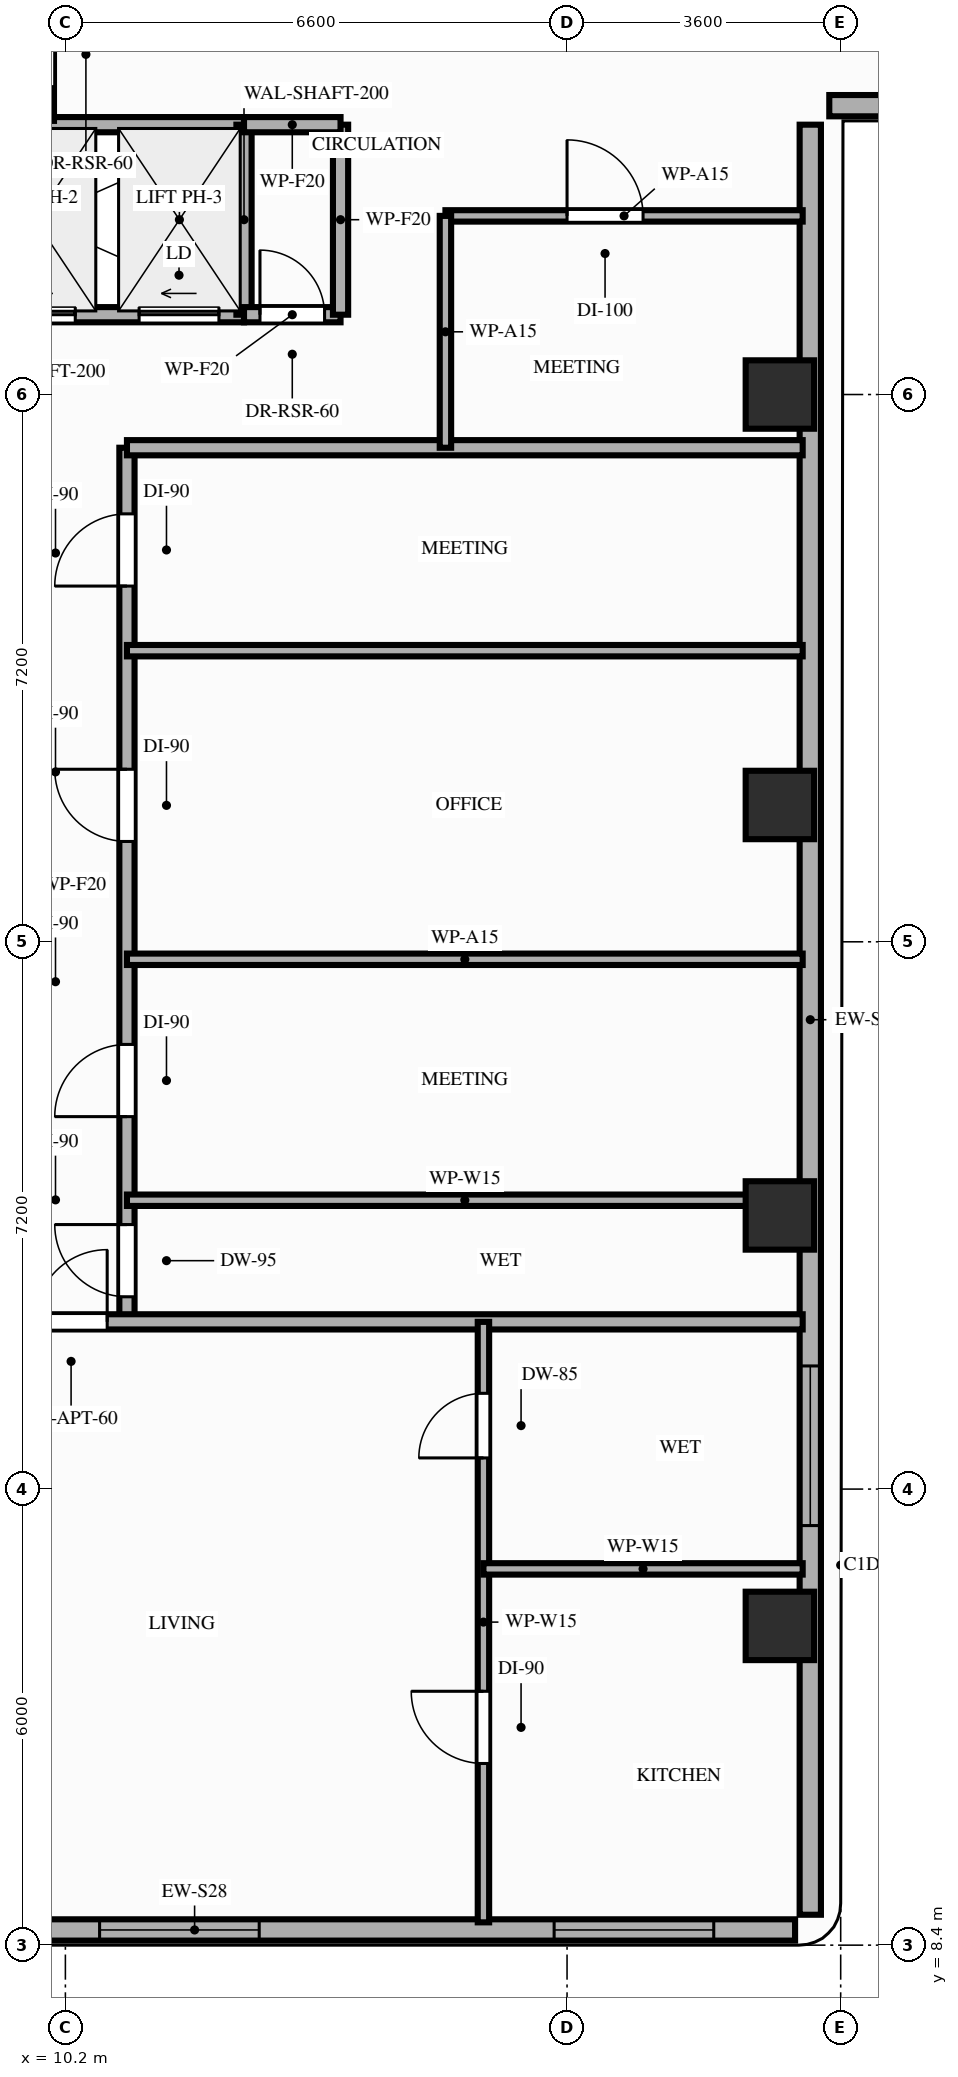
"""IFC4 building model, lengths in metres.
Left out: names, types, materials, properties, quantities, classifications, styles, units other than length and angle.
Written with IfcOpenShell. Run it as: python <this file> out.ifc"""

import sys

from ifc_helpers import new_model, si_unit, direction, frame, frame_2d, origin, origin_2d, place, context, subcontext, project, spatial, rectangle, extrude, element, fill, save


model = new_model("IFC4")
c1 = context("Model", 3, precision=1e-05, world=origin(), true_north=direction((0.0, 1.0)))
c2 = subcontext(c1, "Body", "Model", "MODEL_VIEW")
j1 = project(units=[si_unit("LENGTHUNIT", "METRE"), si_unit("PLANEANGLEUNIT", "RADIAN")], contexts=[c1])
p1 = place(None, origin())
s1 = spatial("IfcSite", under=j1, at=p1, CompositionType="ELEMENT")
p2 = place(p1, origin())
s2 = spatial("IfcBuilding", under=s1, at=p2, CompositionType="ELEMENT")
p3 = place(p2, frame((0.0, 0.0, 208.0)))
s3 = spatial("IfcBuildingStorey", under=s2, at=p3, CompositionType="ELEMENT", Elevation=208.0)
for number, where, z_axis, x_axis in (
    (1, (19.6, 12.6, 0.0), (0.0, 0.0, 1.0), (1.0, 0.0, 0.0)),
    (2, (19.6, 18.0, 0.0), (0.0, 0.0, 1.0), (1.0, 0.0, 0.0)),
    (3, (19.6, 23.4, 0.0), (0.0, 0.0, 1.0), (1.0, 0.0, 0.0)),
    (4, (19.6, 28.8, 0.0), (0.0, 0.0, 1.0), (1.0, 0.0, 0.0)),
):
    element("IfcColumn", number, at=place(p3, frame(where, z_axis=z_axis, x_axis=x_axis)), inside=s3, PredefinedType="COLUMN", context=c2, shape_type="SweptSolid", body=[
        extrude(rectangle(XDim=0.9, YDim=0.9, at=origin_2d()), origin(), (0.0, 0.0, 1.0), 3.2),
    ])
p4 = place(p3, frame((4.0, 8.6, 0.0), z_axis=(0.0, 0.0, 1.0), x_axis=(1.0, 0.0, 0.0)))
e5 = element("IfcWall", 5, at=p4, inside=s3, PredefinedType="STANDARD", context=c2, shape_type="SweptSolid", body=[
    extrude(rectangle(XDim=15.8, YDim=0.28, at=frame_2d((7.9, 0.0))), origin(), (0.0, 0.0, 1.0), 3.02),
])
p5 = place(p4, frame((6.65, 0.0, 0.85)))
e6 = element("IfcOpeningElement", 6, at=p5, cuts=e5, PredefinedType="OPENING", context=c2, shape_type="SweptSolid", body=[
    extrude(rectangle(XDim=2.1, YDim=1.8, at=frame_2d((1.05, 0.9))), frame((0.0, 0.15, 0.0), z_axis=(0.0, -1.0, 0.0), x_axis=(1.0, 0.0, 0.0)), (0.0, 0.0, 1.0), 0.3),
])
p6 = place(p4, frame((12.63, 0.0, 0.85)))
e7 = element("IfcOpeningElement", 7, at=p6, cuts=e5, PredefinedType="OPENING", context=c2, shape_type="SweptSolid", body=[
    extrude(rectangle(XDim=2.1, YDim=1.8, at=frame_2d((1.05, 0.9))), frame((0.0, 0.15, 0.0), z_axis=(0.0, -1.0, 0.0), x_axis=(1.0, 0.0, 0.0)), (0.0, 0.0, 1.0), 0.3),
])
p7 = place(p3, frame((20.0, 8.8, 0.0), z_axis=(0.0, 0.0, 1.0), x_axis=(0.0, 1.0, 0.0)))
e8 = element("IfcWall", 8, at=p7, inside=s3, PredefinedType="STANDARD", context=c2, shape_type="SweptSolid", body=[
    extrude(rectangle(XDim=23.55, YDim=0.28, at=frame_2d((11.775, 0.0))), origin(), (0.0, 0.0, 1.0), 2.51),
])
p8 = place(p7, frame((5.12, 0.0, 0.85)))
e9 = element("IfcOpeningElement", 9, at=p8, cuts=e8, PredefinedType="OPENING", context=c2, shape_type="SweptSolid", body=[
    extrude(rectangle(XDim=2.1, YDim=1.41, at=frame_2d((1.05, 0.705))), frame((0.0, 0.15, 0.0), z_axis=(0.0, -1.0, 0.0), x_axis=(1.0, 0.0, 0.0)), (0.0, 0.0, 1.0), 0.3),
])
p9 = place(p3, frame((20.25, 32.6, 0.0), z_axis=(0.0, 0.0, 1.0), x_axis=(1.0, 0.0, 0.0)))
e10 = element("IfcWall", 10, at=p9, inside=s3, PredefinedType="STANDARD", context=c2, shape_type="SweptSolid", body=[
    extrude(rectangle(XDim=7.35, YDim=0.28, at=frame_2d((3.675, 0.0))), origin(), (0.0, 0.0, 1.0), 2.51),
])
p10 = place(p3, frame((7.0, 29.85, 0.0), z_axis=(0.0, 0.0, 1.0), x_axis=(1.0, 0.0, 0.0)))
e11 = element("IfcWall", 11, at=p10, inside=s3, PredefinedType="MOVABLE", context=c2, shape_type="SweptSolid", body=[
    extrude(rectangle(XDim=5.55, YDim=0.2, at=frame_2d((2.775, 0.0))), origin(), (0.0, 0.0, 1.0), 3.02),
])
p11 = place(p10, frame((0.38, 0.0, 0.0)))
e12 = element("IfcOpeningElement", 12, at=p11, cuts=e11, PredefinedType="OPENING", context=c2, shape_type="SweptSolid", body=[
    extrude(rectangle(XDim=1.05, YDim=2.15, at=frame_2d((0.525, 1.075))), frame((0.0, 0.11, 0.0), z_axis=(0.0, -1.0, 0.0), x_axis=(1.0, 0.0, 0.0)), (0.0, 0.0, 1.0), 0.22),
])
p12 = place(p10, frame((2.28, 0.0, 0.0)))
e13 = element("IfcOpeningElement", 13, at=p12, cuts=e11, PredefinedType="OPENING", context=c2, shape_type="SweptSolid", body=[
    extrude(rectangle(XDim=1.05, YDim=2.15, at=frame_2d((0.525, 1.075))), frame((0.0, 0.11, 0.0), z_axis=(0.0, -1.0, 0.0), x_axis=(1.0, 0.0, 0.0)), (0.0, 0.0, 1.0), 0.22),
])
p13 = place(p10, frame((4.17, 0.0, 0.0)))
e14 = element("IfcOpeningElement", 14, at=p13, cuts=e11, PredefinedType="OPENING", context=c2, shape_type="SweptSolid", body=[
    extrude(rectangle(XDim=1.05, YDim=2.15, at=frame_2d((0.525, 1.075))), frame((0.0, 0.11, 0.0), z_axis=(0.0, -1.0, 0.0), x_axis=(1.0, 0.0, 0.0)), (0.0, 0.0, 1.0), 0.22),
])
p14 = place(p3, frame((7.0, 32.35, 0.0), z_axis=(0.0, 0.0, 1.0), x_axis=(1.0, 0.0, 0.0)))
e15 = element("IfcWall", 15, at=p14, inside=s3, PredefinedType="MOVABLE", context=c2, shape_type="SweptSolid", body=[
    extrude(rectangle(XDim=5.55, YDim=0.2, at=frame_2d((2.775, 0.0))), origin(), (0.0, 0.0, 1.0), 3.02),
])
p15 = place(p3, frame((12.55, 29.85, 0.0), z_axis=(0.0, 0.0, 1.0), x_axis=(0.0, 1.0, 0.0)))
e16 = element("IfcWall", 16, at=p15, inside=s3, PredefinedType="MOVABLE", context=c2, shape_type="SweptSolid", body=[
    extrude(rectangle(XDim=2.5, YDim=0.2, at=frame_2d((1.25, 0.0))), origin(), (0.0, 0.0, 1.0), 3.02),
])
p16 = place(p3, frame((12.55, 29.85, 0.0), z_axis=(0.0, 0.0, 1.0), x_axis=(1.0, 0.0, 0.0)))
e17 = element("IfcWall", 17, at=p16, inside=s3, PredefinedType="PARTITIONING", context=c2, shape_type="SweptSolid", body=[
    extrude(rectangle(XDim=1.27, YDim=0.2, at=frame_2d((0.635, 0.0))), origin(), (0.0, 0.0, 1.0), 3.02),
])
p17 = place(p16, frame((0.21, 0.0, 0.0)))
e18 = element("IfcOpeningElement", 18, at=p17, cuts=e17, PredefinedType="OPENING", context=c2, shape_type="SweptSolid", body=[
    extrude(rectangle(XDim=0.85, YDim=2.05, at=frame_2d((0.425, 1.025))), frame((0.0, 0.11, 0.0), z_axis=(0.0, -1.0, 0.0), x_axis=(1.0, 0.0, 0.0)), (0.0, 0.0, 1.0), 0.22),
])
p18 = place(p3, frame((13.82, 29.85, 0.0), z_axis=(0.0, 0.0, 1.0), x_axis=(0.0, 1.0, 0.0)))
e19 = element("IfcWall", 19, at=p18, inside=s3, PredefinedType="PARTITIONING", context=c2, shape_type="SweptSolid", body=[
    extrude(rectangle(XDim=2.5, YDim=0.2, at=frame_2d((1.25, 0.0))), origin(), (0.0, 0.0, 1.0), 3.02),
])
p19 = place(p3, frame((12.55, 32.35, 0.0), z_axis=(0.0, 0.0, 1.0), x_axis=(1.0, 0.0, 0.0)))
e20 = element("IfcWall", 20, at=p19, inside=s3, PredefinedType="PARTITIONING", context=c2, shape_type="SweptSolid", body=[
    extrude(rectangle(XDim=1.27, YDim=0.2, at=frame_2d((0.635, 0.0))), origin(), (0.0, 0.0, 1.0), 3.02),
])
p20 = place(p3, frame((9.95, 32.4, 0.0), z_axis=(0.0, 0.0, 1.0), x_axis=(0.0, 1.0, 0.0)))
e21 = element("IfcWall", 21, at=p20, inside=s3, PredefinedType="PARTITIONING", context=c2, shape_type="SweptSolid", body=[
    extrude(rectangle(XDim=1.52, YDim=0.2, at=frame_2d((0.76, 0.0))), origin(), (0.0, 0.0, 1.0), 2.51),
])
p21 = place(p20, frame((0.45, 0.0, 0.0)))
e22 = element("IfcOpeningElement", 22, at=p21, cuts=e21, PredefinedType="OPENING", context=c2, shape_type="SweptSolid", body=[
    extrude(rectangle(XDim=0.85, YDim=2.05, at=frame_2d((0.425, 1.025))), frame((0.0, 0.11, 0.0), z_axis=(0.0, -1.0, 0.0), x_axis=(1.0, 0.0, 0.0)), (0.0, 0.0, 1.0), 0.22),
])
p22 = place(p3, frame((11.01, 16.6, 0.0), z_axis=(0.0, 0.0, 1.0), x_axis=(0.0, 1.0, 0.0)))
e23 = element("IfcWall", 23, at=p22, inside=s3, PredefinedType="PARTITIONING", context=c2, shape_type="SweptSolid", body=[
    extrude(rectangle(XDim=11.5, YDim=0.2, at=frame_2d((5.75, 0.0))), origin(), (0.0, 0.0, 1.0), 2.51),
])
p23 = place(p22, frame((0.33, 0.0, 0.0)))
e24 = element("IfcOpeningElement", 24, at=p23, cuts=e23, PredefinedType="OPENING", context=c2, shape_type="SweptSolid", body=[
    extrude(rectangle(XDim=0.95, YDim=2.1, at=frame_2d((0.475, 1.05))), frame((0.0, 0.11, 0.0), z_axis=(0.0, -1.0, 0.0), x_axis=(1.0, 0.0, 0.0)), (0.0, 0.0, 1.0), 0.22),
])
p24 = place(p22, frame((2.7, 0.0, 0.0)))
e25 = element("IfcOpeningElement", 25, at=p24, cuts=e23, PredefinedType="OPENING", context=c2, shape_type="SweptSolid", body=[
    extrude(rectangle(XDim=0.95, YDim=2.15, at=frame_2d((0.475, 1.075))), frame((0.0, 0.11, 0.0), z_axis=(0.0, -1.0, 0.0), x_axis=(1.0, 0.0, 0.0)), (0.0, 0.0, 1.0), 0.22),
])
p25 = place(p22, frame((6.32, 0.0, 0.0)))
e26 = element("IfcOpeningElement", 26, at=p25, cuts=e23, PredefinedType="OPENING", context=c2, shape_type="SweptSolid", body=[
    extrude(rectangle(XDim=0.95, YDim=2.15, at=frame_2d((0.475, 1.075))), frame((0.0, 0.11, 0.0), z_axis=(0.0, -1.0, 0.0), x_axis=(1.0, 0.0, 0.0)), (0.0, 0.0, 1.0), 0.22),
])
p26 = place(p22, frame((9.68, 0.0, 0.0)))
e27 = element("IfcOpeningElement", 27, at=p26, cuts=e23, PredefinedType="OPENING", context=c2, shape_type="SweptSolid", body=[
    extrude(rectangle(XDim=0.95, YDim=2.15, at=frame_2d((0.475, 1.075))), frame((0.0, 0.11, 0.0), z_axis=(0.0, -1.0, 0.0), x_axis=(1.0, 0.0, 0.0)), (0.0, 0.0, 1.0), 0.22),
])
p27 = place(p3, frame((3.9, 16.6, 0.0), z_axis=(0.0, 0.0, 1.0), x_axis=(1.0, 0.0, 0.0)))
e28 = element("IfcWall", 28, at=p27, inside=s3, PredefinedType="PARTITIONING", context=c2, shape_type="SweptSolid", body=[
    extrude(rectangle(XDim=16.0, YDim=0.2, at=frame_2d((8.0, 0.0))), origin(), (0.0, 0.0, 1.0), 2.51),
])
p28 = place(p27, frame((5.9, 0.0, 0.0)))
e29 = element("IfcOpeningElement", 29, at=p28, cuts=e28, PredefinedType="OPENING", context=c2, shape_type="SweptSolid", body=[
    extrude(rectangle(XDim=0.95, YDim=2.15, at=frame_2d((0.475, 1.075))), frame((0.0, 0.11, 0.0), z_axis=(0.0, -1.0, 0.0), x_axis=(1.0, 0.0, 0.0)), (0.0, 0.0, 1.0), 0.22),
])
p29 = place(p3, frame((11.01, 28.1, 0.0), z_axis=(0.0, 0.0, 1.0), x_axis=(1.0, 0.0, 0.0)))
e30 = element("IfcWall", 30, at=p29, inside=s3, PredefinedType="PARTITIONING", context=c2, shape_type="SweptSolid", body=[
    extrude(rectangle(XDim=8.89, YDim=0.2, at=frame_2d((4.445, 0.0))), origin(), (0.0, 0.0, 1.0), 2.51),
])
p30 = place(p3, frame((15.2, 31.15, 0.0), z_axis=(0.0, 0.0, 1.0), x_axis=(1.0, 0.0, 0.0)))
e31 = element("IfcWall", 31, at=p30, inside=s3, PredefinedType="PARTITIONING", context=c2, shape_type="SweptSolid", body=[
    extrude(rectangle(XDim=4.7, YDim=0.15, at=frame_2d((2.35, 0.0))), origin(), (0.0, 0.0, 1.0), 2.51),
])
p31 = place(p30, frame((1.6, 0.0, 0.0)))
e32 = element("IfcOpeningElement", 32, at=p31, cuts=e31, PredefinedType="OPENING", context=c2, shape_type="SweptSolid", body=[
    extrude(rectangle(XDim=1.0, YDim=2.15, at=frame_2d((0.5, 1.075))), frame((0.0, 0.085, 0.0), z_axis=(0.0, -1.0, 0.0), x_axis=(1.0, 0.0, 0.0)), (0.0, 0.0, 1.0), 0.17),
])
p32 = place(p3, frame((15.2, 28.1, 0.0), z_axis=(0.0, 0.0, 1.0), x_axis=(0.0, 1.0, 0.0)))
e33 = element("IfcWall", 33, at=p32, inside=s3, PredefinedType="PARTITIONING", context=c2, shape_type="SweptSolid", body=[
    extrude(rectangle(XDim=3.05, YDim=0.15, at=frame_2d((1.525, 0.0))), origin(), (0.0, 0.0, 1.0), 2.51),
])
p33 = place(p3, frame((15.7, 8.7, 0.0), z_axis=(0.0, 0.0, 1.0), x_axis=(0.0, 1.0, 0.0)))
e34 = element("IfcWall", 34, at=p33, inside=s3, PredefinedType="PARTITIONING", context=c2, shape_type="SweptSolid", body=[
    extrude(rectangle(XDim=7.9, YDim=0.15, at=frame_2d((3.95, 0.0))), origin(), (0.0, 0.0, 1.0), 2.51),
])
p34 = place(p33, frame((2.09, 0.0, 0.0)))
e35 = element("IfcOpeningElement", 35, at=p34, cuts=e34, PredefinedType="OPENING", context=c2, shape_type="SweptSolid", body=[
    extrude(rectangle(XDim=0.95, YDim=2.15, at=frame_2d((0.475, 1.075))), frame((0.0, 0.085, 0.0), z_axis=(0.0, -1.0, 0.0), x_axis=(1.0, 0.0, 0.0)), (0.0, 0.0, 1.0), 0.17),
])
p35 = place(p33, frame((6.11, 0.0, 0.0)))
e36 = element("IfcOpeningElement", 36, at=p35, cuts=e34, PredefinedType="OPENING", context=c2, shape_type="SweptSolid", body=[
    extrude(rectangle(XDim=0.85, YDim=2.1, at=frame_2d((0.425, 1.05))), frame((0.0, 0.085, 0.0), z_axis=(0.0, -1.0, 0.0), x_axis=(1.0, 0.0, 0.0)), (0.0, 0.0, 1.0), 0.17),
])
p36 = place(p3, frame((15.7, 13.35, 0.0), z_axis=(0.0, 0.0, 1.0), x_axis=(1.0, 0.0, 0.0)))
e37 = element("IfcWall", 37, at=p36, inside=s3, PredefinedType="PARTITIONING", context=c2, shape_type="SweptSolid", body=[
    extrude(rectangle(XDim=4.2, YDim=0.15, at=frame_2d((2.1, 0.0))), origin(), (0.0, 0.0, 1.0), 2.51),
])
for number, where, z_axis, x_axis in (
    (38, (11.01, 18.2, 0.0), (0.0, 0.0, 1.0), (1.0, 0.0, 0.0)),
    (39, (11.01, 21.37, 0.0), (0.0, 0.0, 1.0), (1.0, 0.0, 0.0)),
    (40, (11.01, 25.43, 0.0), (0.0, 0.0, 1.0), (1.0, 0.0, 0.0)),
):
    element("IfcWall", number, at=place(p3, frame(where, z_axis=z_axis, x_axis=x_axis)), inside=s3, PredefinedType="PARTITIONING", context=c2, shape_type="SweptSolid", body=[
        extrude(rectangle(XDim=8.89, YDim=0.15, at=frame_2d((4.445, 0.0))), origin(), (0.0, 0.0, 1.0), 2.51),
    ])
p37 = place(p5, origin())
e41 = element("IfcWindow", 41, at=p37, inside=s3, PartitioningType="SINGLE_PANEL", PredefinedType="WINDOW", context=c2, shape_type="SweptSolid", body=[
    extrude(rectangle(XDim=2.1, YDim=1.8, at=frame_2d((1.05, 0.9))), frame((0.0, 0.03, 0.0), z_axis=(0.0, -1.0, 0.0), x_axis=(1.0, 0.0, 0.0)), (0.0, 0.0, 1.0), 0.06),
])
fill(e6, e41)
p38 = place(p6, origin())
e42 = element("IfcWindow", 42, at=p38, inside=s3, PartitioningType="SINGLE_PANEL", PredefinedType="WINDOW", context=c2, shape_type="SweptSolid", body=[
    extrude(rectangle(XDim=2.1, YDim=1.8, at=frame_2d((1.05, 0.9))), frame((0.0, 0.03, 0.0), z_axis=(0.0, -1.0, 0.0), x_axis=(1.0, 0.0, 0.0)), (0.0, 0.0, 1.0), 0.06),
])
fill(e7, e42)
p39 = place(p8, origin())
e43 = element("IfcWindow", 43, at=p39, inside=s3, PartitioningType="SINGLE_PANEL", PredefinedType="WINDOW", context=c2, shape_type="SweptSolid", body=[
    extrude(rectangle(XDim=2.1, YDim=1.41, at=frame_2d((1.05, 0.705))), frame((0.0, 0.03, 0.0), z_axis=(0.0, -1.0, 0.0), x_axis=(1.0, 0.0, 0.0)), (0.0, 0.0, 1.0), 0.06),
])
fill(e9, e43)
p40 = place(p12, origin())
e44 = element("IfcDoor", 44, at=p40, inside=s3, OperationType="SLIDING_TO_LEFT", PredefinedType="DOOR", context=c2, shape_type="SweptSolid", body=[
    extrude(rectangle(XDim=1.05, YDim=2.15, at=frame_2d((0.525, 1.075))), frame((0.0, 0.025, 0.0), z_axis=(0.0, -1.0, 0.0), x_axis=(1.0, 0.0, 0.0)), (0.0, 0.0, 1.0), 0.05),
])
fill(e13, e44)
p41 = place(p13, origin())
e45 = element("IfcDoor", 45, at=p41, inside=s3, OperationType="SLIDING_TO_LEFT", PredefinedType="DOOR", context=c2, shape_type="SweptSolid", body=[
    extrude(rectangle(XDim=1.05, YDim=2.15, at=frame_2d((0.525, 1.075))), frame((0.0, 0.025, 0.0), z_axis=(0.0, -1.0, 0.0), x_axis=(1.0, 0.0, 0.0)), (0.0, 0.0, 1.0), 0.05),
])
fill(e14, e45)
p42 = place(p17, origin())
e46 = element("IfcDoor", 46, at=p42, inside=s3, OperationType="SINGLE_SWING_LEFT", PredefinedType="DOOR", context=c2, shape_type="SweptSolid", body=[
    extrude(rectangle(XDim=0.85, YDim=2.05, at=frame_2d((0.425, 1.025))), frame((0.0, 0.025, 0.0), z_axis=(0.0, -1.0, 0.0), x_axis=(1.0, 0.0, 0.0)), (0.0, 0.0, 1.0), 0.05),
])
fill(e18, e46)
p43 = place(p31, origin())
e47 = element("IfcDoor", 47, at=p43, inside=s3, OperationType="SINGLE_SWING_LEFT", PredefinedType="DOOR", context=c2, shape_type="SweptSolid", body=[
    extrude(rectangle(XDim=1.0, YDim=2.15, at=frame_2d((0.5, 1.075))), frame((0.0, 0.025, 0.0), z_axis=(0.0, -1.0, 0.0), x_axis=(1.0, 0.0, 0.0)), (0.0, 0.0, 1.0), 0.05),
])
fill(e32, e47)
p44 = place(p28, origin())
e48 = element("IfcDoor", 48, at=p44, inside=s3, OperationType="SINGLE_SWING_RIGHT", PredefinedType="DOOR", context=c2, shape_type="SweptSolid", body=[
    extrude(rectangle(XDim=0.95, YDim=2.15, at=frame_2d((0.475, 1.075))), frame((0.0, 0.025, 0.0), z_axis=(0.0, -1.0, 0.0), x_axis=(1.0, 0.0, 0.0)), (0.0, 0.0, 1.0), 0.05),
])
fill(e29, e48)
p45 = place(p34, origin())
e49 = element("IfcDoor", 49, at=p45, inside=s3, OperationType="SINGLE_SWING_RIGHT", PredefinedType="DOOR", context=c2, shape_type="SweptSolid", body=[
    extrude(rectangle(XDim=0.95, YDim=2.15, at=frame_2d((0.475, 1.075))), frame((0.0, 0.025, 0.0), z_axis=(0.0, -1.0, 0.0), x_axis=(1.0, 0.0, 0.0)), (0.0, 0.0, 1.0), 0.05),
])
fill(e35, e49)
p46 = place(p35, origin())
e50 = element("IfcDoor", 50, at=p46, inside=s3, OperationType="SINGLE_SWING_LEFT", PredefinedType="DOOR", context=c2, shape_type="SweptSolid", body=[
    extrude(rectangle(XDim=0.85, YDim=2.1, at=frame_2d((0.425, 1.05))), frame((0.0, 0.025, 0.0), z_axis=(0.0, -1.0, 0.0), x_axis=(1.0, 0.0, 0.0)), (0.0, 0.0, 1.0), 0.05),
])
fill(e36, e50)
p47 = place(p23, origin())
e51 = element("IfcDoor", 51, at=p47, inside=s3, OperationType="SINGLE_SWING_RIGHT", PredefinedType="DOOR", context=c2, shape_type="SweptSolid", body=[
    extrude(rectangle(XDim=0.95, YDim=2.1, at=frame_2d((0.475, 1.05))), frame((0.0, 0.025, 0.0), z_axis=(0.0, -1.0, 0.0), x_axis=(1.0, 0.0, 0.0)), (0.0, 0.0, 1.0), 0.05),
])
fill(e24, e51)
p48 = place(p24, origin())
e52 = element("IfcDoor", 52, at=p48, inside=s3, OperationType="SINGLE_SWING_LEFT", PredefinedType="DOOR", context=c2, shape_type="SweptSolid", body=[
    extrude(rectangle(XDim=0.95, YDim=2.15, at=frame_2d((0.475, 1.075))), frame((0.0, 0.025, 0.0), z_axis=(0.0, -1.0, 0.0), x_axis=(1.0, 0.0, 0.0)), (0.0, 0.0, 1.0), 0.05),
])
fill(e25, e52)
p49 = place(p25, origin())
e53 = element("IfcDoor", 53, at=p49, inside=s3, OperationType="SINGLE_SWING_RIGHT", PredefinedType="DOOR", context=c2, shape_type="SweptSolid", body=[
    extrude(rectangle(XDim=0.95, YDim=2.15, at=frame_2d((0.475, 1.075))), frame((0.0, 0.025, 0.0), z_axis=(0.0, -1.0, 0.0), x_axis=(1.0, 0.0, 0.0)), (0.0, 0.0, 1.0), 0.05),
])
fill(e26, e53)
p50 = place(p26, origin())
e54 = element("IfcDoor", 54, at=p50, inside=s3, OperationType="SINGLE_SWING_LEFT", PredefinedType="DOOR", context=c2, shape_type="SweptSolid", body=[
    extrude(rectangle(XDim=0.95, YDim=2.15, at=frame_2d((0.475, 1.075))), frame((0.0, 0.025, 0.0), z_axis=(0.0, -1.0, 0.0), x_axis=(1.0, 0.0, 0.0)), (0.0, 0.0, 1.0), 0.05),
])
fill(e27, e54)
save(model, sys.argv[1])
